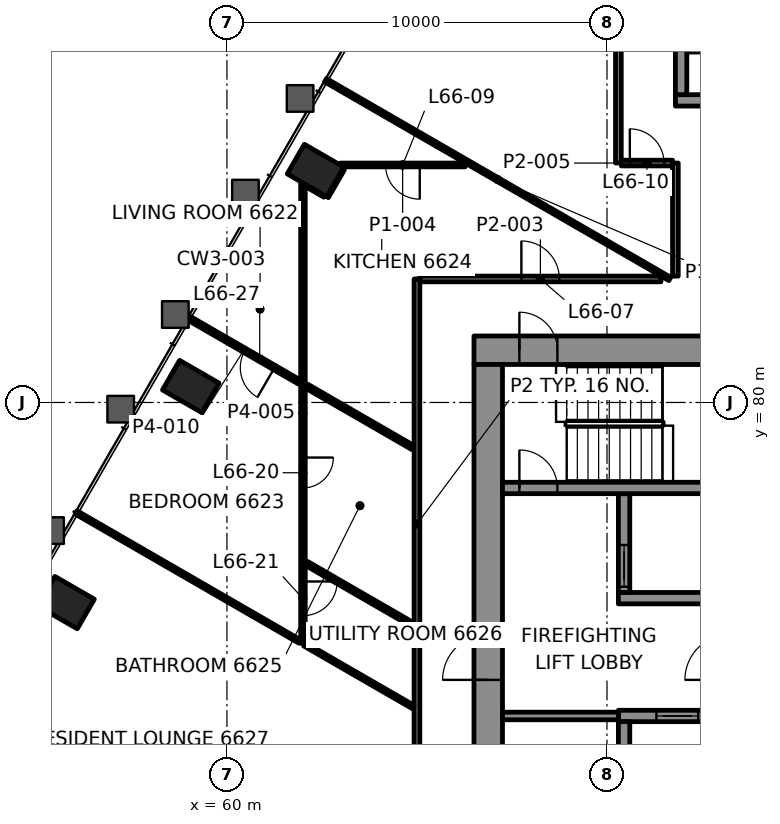
"""IFC4 building model, lengths in metres.
Left out: names, types, materials, properties, quantities, classifications, styles, units other than length and angle.
Written with IfcOpenShell. Run it as: python <this file> out.ifc"""

import sys

from ifc_helpers import new_model, si_unit, direction, frame, frame_2d, origin, origin_2d, place, context, subcontext, project, spatial, rectangle, hollow_rectangle, extrude, element, fill, save


model = new_model("IFC4")
c1 = context("Model", 3, precision=1e-05, world=origin(), true_north=direction((0.0, 1.0)))
c2 = subcontext(c1, "Body", "Model", "MODEL_VIEW")
j1 = project(units=[si_unit("LENGTHUNIT", "METRE"), si_unit("PLANEANGLEUNIT", "RADIAN")], contexts=[c1])
p1 = place(None, origin())
s1 = spatial("IfcSite", under=j1, at=p1, CompositionType="ELEMENT")
p2 = place(p1, origin())
s2 = spatial("IfcBuilding", under=s1, at=p2, CompositionType="ELEMENT")
p3 = place(p2, frame((0.0, 0.0, 277.6)))
s3 = spatial("IfcBuildingStorey", under=s2, at=p3, CompositionType="ELEMENT", Elevation=277.6)
for number, where, z_axis, x_axis in (
    (1, (62.332, 86.105, -0.0), (0.0, 0.0, 1.0), (-0.5, -0.866, 0.0)),
    (2, (59.049, 80.419, -0.0), (0.0, 0.0, 1.0), (-0.5, -0.866, 0.0)),
    (3, (55.766, 74.733, -0.0), (0.0, 0.0, 1.0), (-0.5, -0.866, 0.0)),
):
    element("IfcColumn", number, at=place(p3, frame(where, z_axis=z_axis, x_axis=x_axis)), inside=s3, PredefinedType="COLUMN", context=c2, shape_type="SweptSolid", body=[
        extrude(hollow_rectangle(XDim=0.9, YDim=1.2, WallThickness=0.06, at=origin_2d()), origin(), (0.0, 0.0, 1.0), 3.5),
    ])
p4 = place(p3, frame((66.5, 81.375, 0.0), z_axis=(0.0, 0.0, 1.0), x_axis=(1.0, 0.0, 0.0)))
e4 = element("IfcWall", 4, at=p4, inside=s3, PredefinedType="SHEAR", context=c2, shape_type="SweptSolid", body=[
    extrude(rectangle(XDim=17.0, YDim=0.75, at=frame_2d((8.5, 0.0))), origin(), (0.0, 0.0, 1.0), 3.3),
])
p5 = place(p4, frame((1.195, 0.0, 0.0)))
e5 = element("IfcOpeningElement", 5, at=p5, cuts=e4, PredefinedType="OPENING", context=c2, shape_type="SweptSolid", body=[
    extrude(rectangle(XDim=1.0, YDim=2.1, at=frame_2d((0.5, 1.05))), frame((0.0, 0.385, 0.0), z_axis=(0.0, -1.0, 0.0), x_axis=(1.0, 0.0, 0.0)), (0.0, 0.0, 1.0), 0.77),
])
p6 = place(p4, frame((15.005, 0.0, 0.0)))
e6 = element("IfcOpeningElement", 6, at=p6, cuts=e4, PredefinedType="OPENING", context=c2, shape_type="SweptSolid", body=[
    extrude(rectangle(XDim=1.0, YDim=2.1, at=frame_2d((0.5, 1.05))), frame((0.0, 0.385, 0.0), z_axis=(0.0, -1.0, 0.0), x_axis=(1.0, 0.0, 0.0)), (0.0, 0.0, 1.0), 0.77),
])
p7 = place(p4, frame((8.15, 0.0, 0.0)))
e7 = element("IfcOpeningElement", 7, at=p7, cuts=e4, PredefinedType="OPENING", context=c2, shape_type="SweptSolid", body=[
    extrude(rectangle(XDim=0.9, YDim=2.1, at=frame_2d((0.45, 1.05))), frame((0.0, 0.385, 0.0), z_axis=(0.0, -1.0, 0.0), x_axis=(1.0, 0.0, 0.0)), (0.0, 0.0, 1.0), 0.77),
])
p8 = place(p3, frame((66.875, 69.0, 0.0), z_axis=(0.0, 0.0, 1.0), x_axis=(0.0, 1.0, 0.0)))
e8 = element("IfcWall", 8, at=p8, inside=s3, PredefinedType="SHEAR", context=c2, shape_type="SweptSolid", body=[
    extrude(rectangle(XDim=12.0, YDim=0.75, at=frame_2d((6.0, 0.0))), origin(), (0.0, 0.0, 1.0), 3.3),
])
p9 = place(p8, frame((3.7, 0.0, 0.0)))
e9 = element("IfcOpeningElement", 9, at=p9, cuts=e8, PredefinedType="OPENING", context=c2, shape_type="SweptSolid", body=[
    extrude(rectangle(XDim=1.2, YDim=2.1, at=frame_2d((0.6, 1.05))), frame((0.0, 0.385, 0.0), z_axis=(0.0, -1.0, 0.0), x_axis=(1.0, 0.0, 0.0)), (0.0, 0.0, 1.0), 0.77),
])
p10 = place(p3, frame((70.3, 71.75, 0.0), z_axis=(0.0, 0.0, 1.0), x_axis=(1.0, 0.0, 0.0)))
e10 = element("IfcWall", 10, at=p10, inside=s3, PredefinedType="SHEAR", context=c2, shape_type="SweptSolid", body=[
    extrude(rectangle(XDim=11.5, YDim=0.3, at=frame_2d((5.75, 0.0))), origin(), (0.0, 0.0, 1.0), 3.3),
])
p11 = place(p10, frame((1.0, 0.0, 0.0)))
e11 = element("IfcOpeningElement", 11, at=p11, cuts=e10, PredefinedType="OPENING", context=c2, shape_type="SweptSolid", body=[
    extrude(rectangle(XDim=1.1, YDim=2.1, at=frame_2d((0.55, 1.05))), frame((0.0, 0.16, 0.0), z_axis=(0.0, -1.0, 0.0), x_axis=(1.0, 0.0, 0.0)), (0.0, 0.0, 1.0), 0.32),
])
p12 = place(p10, frame((3.8, 0.0, 0.0)))
e12 = element("IfcOpeningElement", 12, at=p12, cuts=e10, PredefinedType="OPENING", context=c2, shape_type="SweptSolid", body=[
    extrude(rectangle(XDim=1.1, YDim=2.1, at=frame_2d((0.55, 1.05))), frame((0.0, 0.16, 0.0), z_axis=(0.0, -1.0, 0.0), x_axis=(1.0, 0.0, 0.0)), (0.0, 0.0, 1.0), 0.32),
])
p13 = place(p10, frame((6.6, 0.0, 0.0)))
e13 = element("IfcOpeningElement", 13, at=p13, cuts=e10, PredefinedType="OPENING", context=c2, shape_type="SweptSolid", body=[
    extrude(rectangle(XDim=1.1, YDim=2.1, at=frame_2d((0.55, 1.05))), frame((0.0, 0.16, 0.0), z_axis=(0.0, -1.0, 0.0), x_axis=(1.0, 0.0, 0.0)), (0.0, 0.0, 1.0), 0.32),
])
p14 = place(p10, frame((9.4, 0.0, 0.0)))
e14 = element("IfcOpeningElement", 14, at=p14, cuts=e10, PredefinedType="OPENING", context=c2, shape_type="SweptSolid", body=[
    extrude(rectangle(XDim=1.1, YDim=2.1, at=frame_2d((0.55, 1.05))), frame((0.0, 0.16, 0.0), z_axis=(0.0, -1.0, 0.0), x_axis=(1.0, 0.0, 0.0)), (0.0, 0.0, 1.0), 0.32),
])
p15 = place(p3, frame((70.3, 74.85, 0.0), z_axis=(0.0, 0.0, 1.0), x_axis=(1.0, 0.0, 0.0)))
e15 = element("IfcWall", 15, at=p15, inside=s3, PredefinedType="SHEAR", context=c2, shape_type="SweptSolid", body=[
    extrude(rectangle(XDim=5.9, YDim=0.3, at=frame_2d((2.95, 0.0))), origin(), (0.0, 0.0, 1.0), 3.3),
])
p16 = place(p15, frame((3.8, 0.0, 0.0)))
e16 = element("IfcOpeningElement", 16, at=p16, cuts=e15, PredefinedType="OPENING", context=c2, shape_type="SweptSolid", body=[
    extrude(rectangle(XDim=1.1, YDim=2.1, at=frame_2d((0.55, 1.05))), frame((0.0, 0.16, 0.0), z_axis=(0.0, -1.0, 0.0), x_axis=(1.0, 0.0, 0.0)), (0.0, 0.0, 1.0), 0.32),
])
p17 = place(p3, frame((70.45, 69.0, 0.0), z_axis=(0.0, 0.0, 1.0), x_axis=(0.0, 1.0, 0.0)))
e17 = element("IfcWall", 17, at=p17, inside=s3, PredefinedType="SHEAR", context=c2, shape_type="SweptSolid", body=[
    extrude(rectangle(XDim=2.6, YDim=0.3, at=frame_2d((1.3, 0.0))), origin(), (0.0, 0.0, 1.0), 3.3),
])
p18 = place(p3, frame((70.45, 75.0, 0.0), z_axis=(0.0, 0.0, 1.0), x_axis=(0.0, 1.0, 0.0)))
e18 = element("IfcWall", 18, at=p18, inside=s3, PredefinedType="SHEAR", context=c2, shape_type="SweptSolid", body=[
    extrude(rectangle(XDim=2.6, YDim=0.3, at=frame_2d((1.3, 0.0))), origin(), (0.0, 0.0, 1.0), 3.3),
])
p19 = place(p18, frame((0.15, 0.0, 0.0)))
e19 = element("IfcOpeningElement", 19, at=p19, cuts=e18, PredefinedType="OPENING", context=c2, shape_type="SweptSolid", body=[
    extrude(rectangle(XDim=1.1, YDim=2.1, at=frame_2d((0.55, 1.05))), frame((0.0, 0.16, 0.0), z_axis=(0.0, -1.0, 0.0), x_axis=(1.0, 0.0, 0.0)), (0.0, 0.0, 1.0), 0.32),
])
p20 = place(p3, frame((67.25, 77.75, 0.0), z_axis=(0.0, 0.0, 1.0), x_axis=(1.0, 0.0, 0.0)))
e20 = element("IfcWall", 20, at=p20, inside=s3, PredefinedType="SHEAR", context=c2, shape_type="SweptSolid", body=[
    extrude(rectangle(XDim=15.5, YDim=0.3, at=frame_2d((7.75, 0.0))), origin(), (0.0, 0.0, 1.0), 3.3),
])
p21 = place(p20, frame((0.445, 0.0, 0.0)))
e21 = element("IfcOpeningElement", 21, at=p21, cuts=e20, PredefinedType="OPENING", context=c2, shape_type="SweptSolid", body=[
    extrude(rectangle(XDim=1.0, YDim=2.1, at=frame_2d((0.5, 1.05))), frame((0.0, 0.16, 0.0), z_axis=(0.0, -1.0, 0.0), x_axis=(1.0, 0.0, 0.0)), (0.0, 0.0, 1.0), 0.32),
])
p22 = place(p3, frame((71.8, 87.95, 0.0), z_axis=(0.0, 0.0, 1.0), x_axis=(1.0, 0.0, 0.0)))
e22 = element("IfcWall", 22, at=p22, inside=s3, PredefinedType="SHEAR", context=c2, shape_type="SweptSolid", body=[
    extrude(rectangle(XDim=6.4, YDim=0.3, at=frame_2d((3.2, 0.0))), origin(), (0.0, 0.0, 1.0), 3.3),
])
p23 = place(p22, frame((1.325, 0.0, 0.0)))
e23 = element("IfcOpeningElement", 23, at=p23, cuts=e22, PredefinedType="OPENING", context=c2, shape_type="SweptSolid", body=[
    extrude(rectangle(XDim=1.0, YDim=2.1, at=frame_2d((0.5, 1.05))), frame((0.0, 0.16, 0.0), z_axis=(0.0, -1.0, 0.0), x_axis=(1.0, 0.0, 0.0)), (0.0, 0.0, 1.0), 0.32),
])
p24 = place(p22, frame((4.125, 0.0, 0.0)))
e24 = element("IfcOpeningElement", 24, at=p24, cuts=e22, PredefinedType="OPENING", context=c2, shape_type="SweptSolid", body=[
    extrude(rectangle(XDim=1.2, YDim=2.1, at=frame_2d((0.6, 1.05))), frame((0.0, 0.16, 0.0), z_axis=(0.0, -1.0, 0.0), x_axis=(1.0, 0.0, 0.0)), (0.0, 0.0, 1.0), 0.32),
])
p25 = place(p3, frame((71.95, 88.1, 0.0), z_axis=(0.0, 0.0, 1.0), x_axis=(0.0, 1.0, 0.0)))
e25 = element("IfcWall", 25, at=p25, inside=s3, PredefinedType="SHEAR", context=c2, shape_type="SweptSolid", body=[
    extrude(rectangle(XDim=6.2, YDim=0.3, at=frame_2d((3.1, 0.0))), origin(), (0.0, 0.0, 1.0), 3.3),
])
p26 = place(p3, frame((65.075, 83.25, 0.0), z_axis=(0.0, 0.0, 1.0), x_axis=(1.0, 0.0, 0.0)))
e26 = element("IfcWall", 26, at=p26, inside=s3, PredefinedType="PARTITIONING", context=c2, shape_type="SweptSolid", body=[
    extrude(rectangle(XDim=6.345, YDim=0.15, at=frame_2d((3.172, 0.0))), origin(), (0.0, 0.0, 1.0), 2.7),
])
p27 = place(p26, frame((2.672, 0.0, 0.0)))
e27 = element("IfcOpeningElement", 27, at=p27, cuts=e26, PredefinedType="OPENING", context=c2, shape_type="SweptSolid", body=[
    extrude(rectangle(XDim=1.0, YDim=2.1, at=frame_2d((0.5, 1.05))), frame((0.0, 0.085, 0.0), z_axis=(0.0, -1.0, 0.0), x_axis=(1.0, 0.0, 0.0)), (0.0, 0.0, 1.0), 0.17),
])
p28 = place(p3, frame((66.267, 86.25, 0.0), z_axis=(0.0, 0.0, 1.0), x_axis=(-1.0, 0.0, 0.0)))
e28 = element("IfcWall", 28, at=p28, inside=s3, PredefinedType="PARTITIONING", context=c2, shape_type="SweptSolid", body=[
    extrude(rectangle(XDim=3.287, YDim=0.1, at=frame_2d((1.644, 0.0))), origin(), (0.0, 0.0, 1.0), 2.7),
])
p29 = place(p28, frame((1.193, 0.0, 0.0)))
e29 = element("IfcOpeningElement", 29, at=p29, cuts=e28, PredefinedType="OPENING", context=c2, shape_type="SweptSolid", body=[
    extrude(rectangle(XDim=0.9, YDim=2.1, at=frame_2d((0.45, 1.05))), frame((0.0, 0.06, 0.0), z_axis=(0.0, -1.0, 0.0), x_axis=(1.0, 0.0, 0.0)), (0.0, 0.0, 1.0), 0.12),
])
p30 = place(p3, frame((70.377, 86.3, 0.0), z_axis=(0.0, 0.0, 1.0), x_axis=(1.0, 0.0, 0.0)))
e30 = element("IfcWall", 30, at=p30, inside=s3, PredefinedType="PARTITIONING", context=c2, shape_type="SweptSolid", body=[
    extrude(rectangle(XDim=1.348, YDim=0.15, at=frame_2d((0.674, 0.0))), origin(), (0.0, 0.0, 1.0), 2.7),
])
p31 = place(p30, frame((0.224, 0.0, 0.0)))
e31 = element("IfcOpeningElement", 31, at=p31, cuts=e30, PredefinedType="OPENING", context=c2, shape_type="SweptSolid", body=[
    extrude(rectangle(XDim=0.9, YDim=2.1, at=frame_2d((0.45, 1.05))), frame((0.0, 0.085, 0.0), z_axis=(0.0, -1.0, 0.0), x_axis=(1.0, 0.0, 0.0)), (0.0, 0.0, 1.0), 0.17),
])
p32 = place(p3, frame((62.626, 85.415, 0.0), z_axis=(0.0, 0.0, 1.0), x_axis=(0.499973348067, 0.866040790738, 0.0)))
e32 = element("IfcWall", 32, at=p32, inside=s3, PredefinedType="PARTITIONING", context=c2, shape_type="SweptSolid", body=[
    extrude(rectangle(XDim=0.842, YDim=0.1, at=frame_2d((0.421, 0.0))), origin(), (0.0, 0.0, 1.0), 2.7),
])
p33 = place(p3, frame((71.8, 83.325, 0.0), z_axis=(0.0, 0.0, 1.0), x_axis=(0.0, 1.0, 0.0)))
e33 = element("IfcWall", 33, at=p33, inside=s3, PredefinedType="PARTITIONING", context=c2, shape_type="SweptSolid", body=[
    extrude(rectangle(XDim=2.975, YDim=0.15, at=frame_2d((1.488, 0.0))), origin(), (0.0, 0.0, 1.0), 2.697),
])
p34 = place(p3, frame((70.3, 86.302, 0.0), z_axis=(0.0, 0.0, 1.0), x_axis=(0.0, 1.0, 0.0)))
e34 = element("IfcWall", 34, at=p34, inside=s3, PredefinedType="PARTITIONING", context=c2, shape_type="SweptSolid", body=[
    extrude(rectangle(XDim=9.796, YDim=0.15, at=frame_2d((4.898, 0.0))), origin(), (0.0, 0.0, 1.0), 2.7),
])
p35 = place(p3, frame((65.0, 70.352, 0.0), z_axis=(0.0, 0.0, 1.0), x_axis=(0.0, 1.0, 0.0)))
e35 = element("IfcWall", 35, at=p35, inside=s3, PredefinedType="PARTITIONING", context=c2, shape_type="SweptSolid", body=[
    extrude(rectangle(XDim=12.898, YDim=0.15, at=frame_2d((6.449, 0.0))), origin(), (0.0, 0.0, 1.0), 2.7),
])
p36 = place(p3, frame((62.0, 85.776, 0.0), z_axis=(0.0, 0.0, 1.0), x_axis=(0.0, -1.0, 0.0)))
e36 = element("IfcWall", 36, at=p36, inside=s3, PredefinedType="PARTITIONING", context=c2, shape_type="SweptSolid", body=[
    extrude(rectangle(XDim=12.115, YDim=0.12, at=frame_2d((6.058, 0.0))), origin(), (0.0, 0.0, 1.0), 2.688),
])
p37 = place(p36, frame((7.226, 0.0, 0.0)))
e37 = element("IfcOpeningElement", 37, at=p37, cuts=e36, PredefinedType="OPENING", context=c2, shape_type="SweptSolid", body=[
    extrude(rectangle(XDim=0.8, YDim=2.1, at=frame_2d((0.4, 1.05))), frame((0.0, 0.07, 0.0), z_axis=(0.0, -1.0, 0.0), x_axis=(1.0, 0.0, 0.0)), (0.0, 0.0, 1.0), 0.14),
])
p38 = place(p36, frame((10.487, 0.0, 0.0)))
e38 = element("IfcOpeningElement", 38, at=p38, cuts=e36, PredefinedType="OPENING", context=c2, shape_type="SweptSolid", body=[
    extrude(rectangle(XDim=0.9, YDim=2.1, at=frame_2d((0.45, 1.05))), frame((0.0, 0.07, 0.0), z_axis=(0.0, -1.0, 0.0), x_axis=(1.0, 0.0, 0.0)), (0.0, 0.0, 1.0), 0.14),
])
p39 = place(p3, frame((71.653, 83.25, 0.0), z_axis=(0.0, 0.0, 1.0), x_axis=(-0.866025448133, 0.499999923186, 0.0)))
e39 = element("IfcWall", 39, at=p39, inside=s3, PredefinedType="PARTITIONING", context=c2, shape_type="SweptSolid", body=[
    extrude(rectangle(XDim=10.46, YDim=0.1, at=frame_2d((5.23, 0.0))), origin(), (0.0, 0.0, 1.0), 2.688),
])
p40 = place(p3, frame((62.574, 85.445, 0.0), z_axis=(0.0, 0.0, 1.0), x_axis=(-0.866048512801, 0.499959971872, 0.0)))
e40 = element("IfcWall", 40, at=p40, inside=s3, PredefinedType="PARTITIONING", context=c2, shape_type="SweptSolid", body=[
    extrude(rectangle(XDim=0.563, YDim=0.1, at=frame_2d((0.282, 0.0))), origin(), (0.0, 0.0, 1.0), 2.688),
])
p41 = place(p3, frame((64.89, 78.815, 0.0), z_axis=(0.0, 0.0, 1.0), x_axis=(-0.866032190624, 0.499988244665, 0.0)))
e41 = element("IfcWall", 41, at=p41, inside=s3, PredefinedType="PARTITIONING", context=c2, shape_type="SweptSolid", body=[
    extrude(rectangle(XDim=3.233, YDim=0.12, at=frame_2d((1.617, 0.0))), origin(), (0.0, 0.0, 1.0), 2.7),
])
p42 = place(p3, frame((64.891, 74.149, 0.0), z_axis=(0.0, 0.0, 1.0), x_axis=(-0.866019355129, 0.500010476433, 0.0)))
e42 = element("IfcWall", 42, at=p42, inside=s3, PredefinedType="PARTITIONING", context=c2, shape_type="SweptSolid", body=[
    extrude(rectangle(XDim=3.229, YDim=0.12, at=frame_2d((1.614, 0.0))), origin(), (0.0, 0.0, 1.0), 2.7),
])
p43 = place(p3, frame((64.899, 71.987, 0.0), z_axis=(0.0, 0.0, 1.0), x_axis=(-0.866032610133, 0.499987518031, 0.0)))
e43 = element("IfcWall", 43, at=p43, inside=s3, PredefinedType="PARTITIONING", context=c2, shape_type="SweptSolid", body=[
    extrude(rectangle(XDim=3.295, YDim=0.1, at=frame_2d((1.648, 0.0))), origin(), (0.0, 0.0, 1.0), 2.7),
])
p44 = place(p3, frame((61.91, 80.536, 0.0), z_axis=(0.0, 0.0, 1.0), x_axis=(-0.866002725405, 0.500039278049, 0.0)))
e44 = element("IfcWall", 44, at=p44, inside=s3, PredefinedType="PARTITIONING", context=c2, shape_type="SweptSolid", body=[
    extrude(rectangle(XDim=3.38, YDim=0.12, at=frame_2d((1.69, 0.0))), origin(), (0.0, 0.0, 1.0), 2.688),
])
p45 = place(p44, frame((0.76, 0.0, 0.0)))
e45 = element("IfcOpeningElement", 45, at=p45, cuts=e44, PredefinedType="OPENING", context=c2, shape_type="SweptSolid", body=[
    extrude(rectangle(XDim=0.9, YDim=2.1, at=frame_2d((0.45, 1.05))), frame((0.0, 0.07, 0.0), z_axis=(0.0, -1.0, 0.0), x_axis=(1.0, 0.0, 0.0)), (0.0, 0.0, 1.0), 0.14),
])
p46 = place(p3, frame((61.915, 73.71, 0.0), z_axis=(0.0, 0.0, 1.0), x_axis=(-0.866024081565, 0.500002290144, 0.0)))
e46 = element("IfcWall", 46, at=p46, inside=s3, PredefinedType="PARTITIONING", context=c2, shape_type="SweptSolid", body=[
    extrude(rectangle(XDim=6.797, YDim=0.1, at=frame_2d((3.398, 0.0))), origin(), (0.0, 0.0, 1.0), 2.688),
])
p47 = place(p3, frame((67.25, 71.75, 0.0), z_axis=(0.0, 0.0, 1.0), x_axis=(1.0, 0.0, 0.0)))
e47 = element("IfcWall", 47, at=p47, inside=s3, PredefinedType="PARTITIONING", context=c2, shape_type="SweptSolid", body=[
    extrude(rectangle(XDim=3.05, YDim=0.2, at=frame_2d((1.525, 0.0))), origin(), (0.0, 0.0, 1.0), 3.3),
])
p48 = place(p27, origin())
e48 = element("IfcDoor", 48, at=p48, inside=s3, OperationType="SINGLE_SWING_RIGHT", PredefinedType="DOOR", context=c2, shape_type="SweptSolid", body=[
    extrude(rectangle(XDim=1.0, YDim=2.1, at=frame_2d((0.5, 1.05))), frame((0.0, 0.025, 0.0), z_axis=(0.0, -1.0, 0.0), x_axis=(1.0, 0.0, 0.0)), (0.0, 0.0, 1.0), 0.05),
])
fill(e27, e48)
p49 = place(p29, origin())
e49 = element("IfcDoor", 49, at=p49, inside=s3, OperationType="SINGLE_SWING_RIGHT", PredefinedType="DOOR", context=c2, shape_type="SweptSolid", body=[
    extrude(rectangle(XDim=0.9, YDim=2.1, at=frame_2d((0.45, 1.05))), frame((0.0, 0.025, 0.0), z_axis=(0.0, -1.0, 0.0), x_axis=(1.0, 0.0, 0.0)), (0.0, 0.0, 1.0), 0.05),
])
fill(e29, e49)
p50 = place(p31, origin())
e50 = element("IfcDoor", 50, at=p50, inside=s3, OperationType="SINGLE_SWING_RIGHT", PredefinedType="DOOR", context=c2, shape_type="SweptSolid", body=[
    extrude(rectangle(XDim=0.9, YDim=2.1, at=frame_2d((0.45, 1.05))), frame((0.0, 0.025, 0.0), z_axis=(0.0, -1.0, 0.0), x_axis=(1.0, 0.0, 0.0)), (0.0, 0.0, 1.0), 0.05),
])
fill(e31, e50)
p51 = place(p37, origin())
e51 = element("IfcDoor", 51, at=p51, inside=s3, OperationType="SINGLE_SWING_RIGHT", PredefinedType="DOOR", context=c2, shape_type="SweptSolid", body=[
    extrude(rectangle(XDim=0.8, YDim=2.1, at=frame_2d((0.4, 1.05))), frame((0.0, 0.025, 0.0), z_axis=(0.0, -1.0, 0.0), x_axis=(1.0, 0.0, 0.0)), (0.0, 0.0, 1.0), 0.05),
])
fill(e37, e51)
p52 = place(p38, origin())
e52 = element("IfcDoor", 52, at=p52, inside=s3, OperationType="SINGLE_SWING_LEFT", PredefinedType="DOOR", context=c2, shape_type="SweptSolid", body=[
    extrude(rectangle(XDim=0.9, YDim=2.1, at=frame_2d((0.45, 1.05))), frame((0.0, 0.025, 0.0), z_axis=(0.0, -1.0, 0.0), x_axis=(1.0, 0.0, 0.0)), (0.0, 0.0, 1.0), 0.05),
])
fill(e38, e52)
p53 = place(p45, origin())
e53 = element("IfcDoor", 53, at=p53, inside=s3, OperationType="SINGLE_SWING_LEFT", PredefinedType="DOOR", context=c2, shape_type="SweptSolid", body=[
    extrude(rectangle(XDim=0.9, YDim=2.1, at=frame_2d((0.45, 1.05))), frame((0.0, 0.025, 0.0), z_axis=(0.0, -1.0, 0.0), x_axis=(1.0, 0.0, 0.0)), (0.0, 0.0, 1.0), 0.05),
])
fill(e45, e53)
p54 = place(p11, origin())
e54 = element("IfcDoor", 54, at=p54, inside=s3, OperationType="DOUBLE_DOOR_SLIDING", PredefinedType="DOOR", context=c2, shape_type="SweptSolid", body=[
    extrude(rectangle(XDim=1.1, YDim=2.1, at=frame_2d((0.55, 1.05))), frame((0.0, 0.025, 0.0), z_axis=(0.0, -1.0, 0.0), x_axis=(1.0, 0.0, 0.0)), (0.0, 0.0, 1.0), 0.05),
])
fill(e11, e54)
p55 = place(p19, origin())
e55 = element("IfcDoor", 55, at=p55, inside=s3, OperationType="DOUBLE_DOOR_SLIDING", PredefinedType="DOOR", context=c2, shape_type="SweptSolid", body=[
    extrude(rectangle(XDim=1.1, YDim=2.1, at=frame_2d((0.55, 1.05))), frame((0.0, 0.025, 0.0), z_axis=(0.0, -1.0, 0.0), x_axis=(1.0, 0.0, 0.0)), (0.0, 0.0, 1.0), 0.05),
])
fill(e19, e55)
p56 = place(p21, origin())
e56 = element("IfcDoor", 56, at=p56, inside=s3, OperationType="SINGLE_SWING_LEFT", PredefinedType="DOOR", context=c2, shape_type="SweptSolid", body=[
    extrude(rectangle(XDim=1.0, YDim=2.1, at=frame_2d((0.5, 1.05))), frame((0.0, 0.025, 0.0), z_axis=(0.0, -1.0, 0.0), x_axis=(1.0, 0.0, 0.0)), (0.0, 0.0, 1.0), 0.05),
])
fill(e21, e56)
p57 = place(p5, origin())
e57 = element("IfcDoor", 57, at=p57, inside=s3, OperationType="SINGLE_SWING_RIGHT", PredefinedType="DOOR", context=c2, shape_type="SweptSolid", body=[
    extrude(rectangle(XDim=1.0, YDim=2.1, at=frame_2d((0.5, 1.05))), frame((0.0, 0.095, 0.0), z_axis=(0.0, -1.0, 0.0), x_axis=(1.0, 0.0, 0.0)), (0.0, 0.0, 1.0), 0.19),
])
fill(e5, e57)
p58 = place(p9, origin())
e58 = element("IfcDoor", 58, at=p58, inside=s3, OperationType="SINGLE_SWING_RIGHT", PredefinedType="DOOR", context=c2, shape_type="SweptSolid", body=[
    extrude(rectangle(XDim=1.2, YDim=2.1, at=frame_2d((0.6, 1.05))), frame((0.0, 0.095, 0.0), z_axis=(0.0, -1.0, 0.0), x_axis=(1.0, 0.0, 0.0)), (0.0, 0.0, 1.0), 0.19),
])
fill(e9, e58)
save(model, sys.argv[1])
